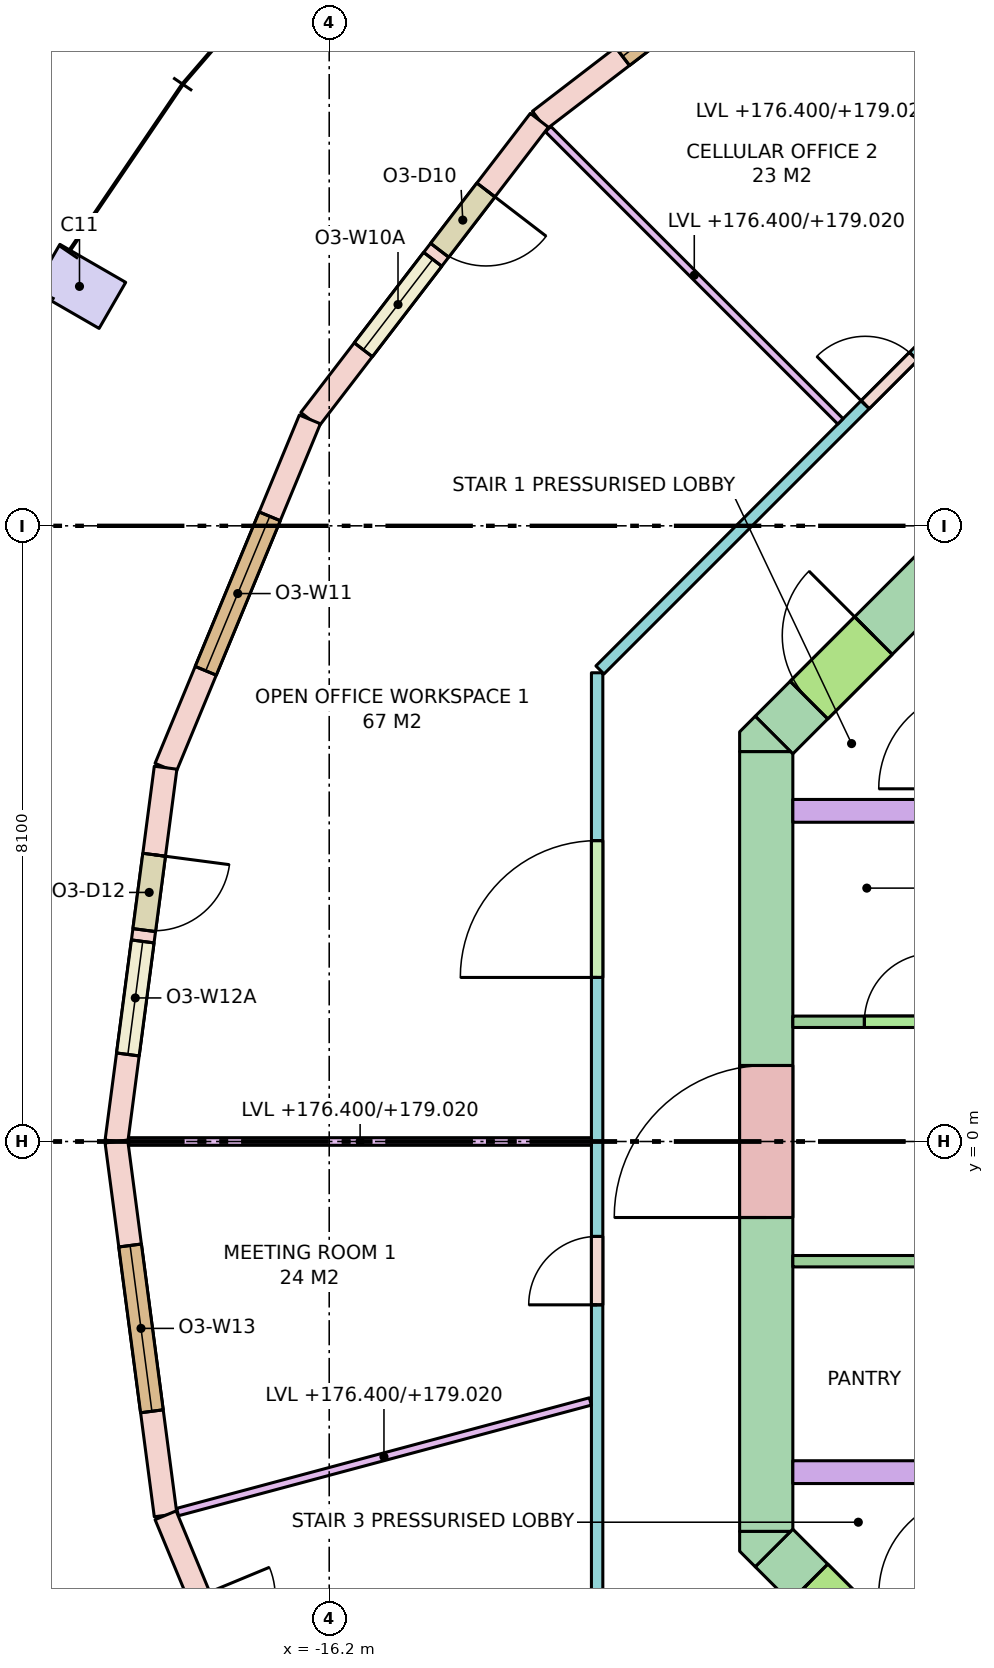
"""IFC4 building model, lengths in metres.
Left out: names, types, materials, properties, quantities, classifications, styles, units other than length and angle.
Written with IfcOpenShell. Run it as: python <this file> out.ifc"""

import sys

from ifc_helpers import new_model, si_unit, direction, frame, frame_2d, origin, origin_2d, place, context, subcontext, project, spatial, polyline, rectangle, outline, extrude, element, fill, save


model = new_model("IFC4")
c1 = context("Model", 3, precision=1e-05, world=origin(), true_north=direction((0.0, 1.0)))
c2 = subcontext(c1, "Body", "Model", "MODEL_VIEW")
j1 = project(units=[si_unit("LENGTHUNIT", "METRE"), si_unit("PLANEANGLEUNIT", "RADIAN")], contexts=[c1])
p1 = place(None, origin())
s1 = spatial("IfcSite", under=j1, at=p1, CompositionType="ELEMENT")
p2 = place(p1, origin())
s2 = spatial("IfcBuilding", under=s1, at=p2, CompositionType="ELEMENT")
p3 = place(p2, frame((0.0, 0.0, 176.4)))
s3 = spatial("IfcBuildingStorey", under=s2, at=p3, CompositionType="ELEMENT", Elevation=176.4)
p4 = place(p3, frame((-19.486, 11.25, 0.0), z_axis=(0.0, 0.0, 1.0), x_axis=(-0.5, -0.866025403784, 0.0)))
e1 = element("IfcColumn", 1, at=p4, inside=s3, PredefinedType="COLUMN", context=c2, shape_type="SweptSolid", body=[
    extrude(rectangle(XDim=0.7, YDim=1.0, at=origin_2d()), origin(), (0.0, 0.0, 1.0), 3.7),
])
p5 = place(p3, frame((-10.45, -5.13, -0.28), z_axis=(0.0, 0.0, 1.0), x_axis=(0.0, 1.0, 0.0)))
e2 = element("IfcWall", 2, at=p5, inside=s3, PredefinedType="SHEAR", context=c2, shape_type="SweptSolid", body=[
    extrude(rectangle(XDim=10.26, YDim=0.7, at=frame_2d((5.13, 0.0))), origin(), (0.0, 0.0, 1.0), 3.7),
])
p6 = place(p5, frame((4.13, 0.0, 0.28)))
e3 = element("IfcOpeningElement", 3, at=p6, cuts=e2, PredefinedType="OPENING", context=c2, shape_type="SweptSolid", body=[
    extrude(rectangle(XDim=2.0, YDim=2.1, at=frame_2d((1.0, 1.05))), frame((0.0, 0.36, 0.0), z_axis=(0.0, -1.0, 0.0), x_axis=(1.0, 0.0, 0.0)), (0.0, 0.0, 1.0), 0.72),
])
p7 = place(p3, frame((-10.347, 5.347, -0.28), z_axis=(0.0, 0.0, 1.0), x_axis=(0.707106781187, 0.707106781187, 0.0)))
e4 = element("IfcWall", 4, at=p7, inside=s3, PredefinedType="SHEAR", context=c2, shape_type="SweptSolid", body=[
    extrude(rectangle(XDim=4.243, YDim=0.7, at=frame_2d((2.121, 0.0))), origin(), (0.0, 0.0, 1.0), 3.7),
])
p8 = place(p7, frame((0.65, 0.0, 0.28)))
e5 = element("IfcOpeningElement", 5, at=p8, cuts=e4, PredefinedType="OPENING", context=c2, shape_type="SweptSolid", body=[
    extrude(rectangle(XDim=1.2, YDim=2.1, at=frame_2d((0.6, 1.05))), frame((0.0, 0.36, 0.0), z_axis=(0.0, -1.0, 0.0), x_axis=(1.0, 0.0, 0.0)), (0.0, 0.0, 1.0), 0.72),
])
p9 = place(p3, frame((-7.347, -8.347, -0.28), z_axis=(0.0, 0.0, 1.0), x_axis=(-0.707106781187, 0.707106781187, 0.0)))
e6 = element("IfcWall", 6, at=p9, inside=s3, PredefinedType="SHEAR", context=c2, shape_type="SweptSolid", body=[
    extrude(rectangle(XDim=4.243, YDim=0.7, at=frame_2d((2.121, 0.0))), origin(), (0.0, 0.0, 1.0), 3.7),
])
p10 = place(p9, frame((2.393, 0.0, 0.28)))
e7 = element("IfcOpeningElement", 7, at=p10, cuts=e6, PredefinedType="OPENING", context=c2, shape_type="SweptSolid", body=[
    extrude(rectangle(XDim=1.2, YDim=2.1, at=frame_2d((0.6, 1.05))), frame((0.0, 0.36, 0.0), z_axis=(0.0, -1.0, 0.0), x_axis=(1.0, 0.0, 0.0)), (0.0, 0.0, 1.0), 0.72),
])
p11 = place(p3, frame((0.0, 0.0, -0.28)))
e8 = element("IfcWall", 8, at=p11, inside=s3, PredefinedType="SHEAR", context=c2, shape_type="SweptSolid", body=[
    extrude(outline(polyline([(-10.8, -5.39), (-10.8, -5.13), (-10.8, -5.13), (-10.13, -5.13), (-10.595, -5.595), (-10.595, -5.595), (-10.595, -5.595), (-10.8, -5.39)])), origin(), (0.0, 0.0, 1.0), 3.7),
])
p12 = place(p3, frame((0.0, 0.0, -0.28)))
e9 = element("IfcWall", 9, at=p12, inside=s3, PredefinedType="SHEAR", context=c2, shape_type="SweptSolid", body=[
    extrude(outline(polyline([(-10.595, 5.595), (-10.595, 5.595), (-10.595, 5.595), (-10.13, 5.13), (-10.8, 5.13), (-10.8, 5.13), (-10.8, 5.39), (-10.595, 5.595)])), origin(), (0.0, 0.0, 1.0), 3.7),
])
for number, where, z_axis, x_axis in (
    (10, (-10.1, 4.35, 0.0), (0.0, 0.0, 1.0), (1.0, 0.0, 0.0)),
    (11, (-10.1, -4.35, 0.0), (0.0, 0.0, 1.0), (1.0, 0.0, 0.0)),
):
    element("IfcWall", number, at=place(p3, frame(where, z_axis=z_axis, x_axis=x_axis)), inside=s3, PredefinedType="SOLIDWALL", context=c2, shape_type="SweptSolid", body=[
        extrude(rectangle(XDim=8.1, YDim=0.3, at=frame_2d((4.05, 0.0))), origin(), (0.0, 0.0, 1.0), 3.42),
    ])
p13 = place(p3, frame((-9.5, 16.455, 0.0), z_axis=(0.0, 0.0, 1.0), x_axis=(-0.793348024649, -0.608768356425, 0.0)))
e12 = element("IfcWall", 12, at=p13, inside=s3, PredefinedType="STANDARD", context=c2, shape_type="SweptSolid", body=[
    extrude(rectangle(XDim=4.96, YDim=0.3, at=frame_2d((2.48, 0.0))), origin(), (0.0, 0.0, 1.0), 3.42),
])
p14 = place(p13, frame((1.38, 0.0, 0.8)))
e13 = element("IfcOpeningElement", 13, at=p14, cuts=e12, PredefinedType="OPENING", context=c2, shape_type="SweptSolid", body=[
    extrude(rectangle(XDim=2.2, YDim=2.4, at=frame_2d((1.1, 1.2))), frame((0.0, 0.16, 0.0), z_axis=(0.0, -1.0, 0.0), x_axis=(1.0, 0.0, 0.0)), (0.0, 0.0, 1.0), 0.32),
])
p15 = place(p3, frame((-13.435, 13.435, 0.0), z_axis=(0.0, 0.0, 1.0), x_axis=(-0.608768356425, -0.793348024649, 0.0)))
e14 = element("IfcWall", 14, at=p15, inside=s3, PredefinedType="STANDARD", context=c2, shape_type="SweptSolid", body=[
    extrude(rectangle(XDim=4.96, YDim=0.3, at=frame_2d((2.48, 0.0))), origin(), (0.0, 0.0, 1.0), 3.42),
])
p16 = place(p15, frame((1.155, 0.0, 0.0)))
e15 = element("IfcOpeningElement", 15, at=p16, cuts=e14, PredefinedType="OPENING", context=c2, shape_type="SweptSolid", body=[
    extrude(rectangle(XDim=1.0, YDim=2.4, at=frame_2d((0.5, 1.2))), frame((0.0, 0.16, 0.0), z_axis=(0.0, -1.0, 0.0), x_axis=(1.0, 0.0, 0.0)), (0.0, 0.0, 1.0), 0.32),
])
p17 = place(p15, frame((2.305, 0.0, 0.8)))
e16 = element("IfcOpeningElement", 16, at=p17, cuts=e14, PredefinedType="OPENING", context=c2, shape_type="SweptSolid", body=[
    extrude(rectangle(XDim=1.5, YDim=2.4, at=frame_2d((0.75, 1.2))), frame((0.0, 0.16, 0.0), z_axis=(0.0, -1.0, 0.0), x_axis=(1.0, 0.0, 0.0)), (0.0, 0.0, 1.0), 0.32),
])
p18 = place(p3, frame((-16.455, 9.5, 0.0), z_axis=(0.0, 0.0, 1.0), x_axis=(-0.382650301762, -0.923893254961, 0.0)))
e17 = element("IfcWall", 17, at=p18, inside=s3, PredefinedType="STANDARD", context=c2, shape_type="SweptSolid", body=[
    extrude(rectangle(XDim=4.96, YDim=0.3, at=frame_2d((2.48, 0.0))), origin(), (0.0, 0.0, 1.0), 3.42),
])
p19 = place(p18, frame((1.38, 0.0, 0.8)))
e18 = element("IfcOpeningElement", 18, at=p19, cuts=e17, PredefinedType="OPENING", context=c2, shape_type="SweptSolid", body=[
    extrude(rectangle(XDim=2.2, YDim=2.4, at=frame_2d((1.1, 1.2))), frame((0.0, 0.16, 0.0), z_axis=(0.0, -1.0, 0.0), x_axis=(1.0, 0.0, 0.0)), (0.0, 0.0, 1.0), 0.32),
])
p20 = place(p3, frame((-18.353, 4.917, 0.0), z_axis=(0.0, 0.0, 1.0), x_axis=(-0.130538549191, -0.991443234469, 0.0)))
e19 = element("IfcWall", 19, at=p20, inside=s3, PredefinedType="STANDARD", context=c2, shape_type="SweptSolid", body=[
    extrude(rectangle(XDim=4.96, YDim=0.3, at=frame_2d((2.48, 0.0))), origin(), (0.0, 0.0, 1.0), 3.42),
])
p21 = place(p20, frame((1.155, 0.0, 0.0)))
e20 = element("IfcOpeningElement", 20, at=p21, cuts=e19, PredefinedType="OPENING", context=c2, shape_type="SweptSolid", body=[
    extrude(rectangle(XDim=1.0, YDim=2.4, at=frame_2d((0.5, 1.2))), frame((0.0, 0.16, 0.0), z_axis=(0.0, -1.0, 0.0), x_axis=(1.0, 0.0, 0.0)), (0.0, 0.0, 1.0), 0.32),
])
p22 = place(p20, frame((2.305, 0.0, 0.8)))
e21 = element("IfcOpeningElement", 21, at=p22, cuts=e19, PredefinedType="OPENING", context=c2, shape_type="SweptSolid", body=[
    extrude(rectangle(XDim=1.5, YDim=2.4, at=frame_2d((0.75, 1.2))), frame((0.0, 0.16, 0.0), z_axis=(0.0, -1.0, 0.0), x_axis=(1.0, 0.0, 0.0)), (0.0, 0.0, 1.0), 0.32),
])
p23 = place(p3, frame((-19.0, 0.0, 0.0), z_axis=(0.0, 0.0, 1.0), x_axis=(0.130538549191, -0.991443234469, 0.0)))
e22 = element("IfcWall", 22, at=p23, inside=s3, PredefinedType="STANDARD", context=c2, shape_type="SweptSolid", body=[
    extrude(rectangle(XDim=4.96, YDim=0.3, at=frame_2d((2.48, 0.0))), origin(), (0.0, 0.0, 1.0), 3.42),
])
p24 = place(p23, frame((1.38, 0.0, 0.8)))
e23 = element("IfcOpeningElement", 23, at=p24, cuts=e22, PredefinedType="OPENING", context=c2, shape_type="SweptSolid", body=[
    extrude(rectangle(XDim=2.2, YDim=2.4, at=frame_2d((1.1, 1.2))), frame((0.0, 0.16, 0.0), z_axis=(0.0, -1.0, 0.0), x_axis=(1.0, 0.0, 0.0)), (0.0, 0.0, 1.0), 0.32),
])
p25 = place(p3, frame((-18.353, -4.917, 0.0), z_axis=(0.0, 0.0, 1.0), x_axis=(0.382650301762, -0.923893254961, 0.0)))
e24 = element("IfcWall", 24, at=p25, inside=s3, PredefinedType="STANDARD", context=c2, shape_type="SweptSolid", body=[
    extrude(rectangle(XDim=4.96, YDim=0.3, at=frame_2d((2.48, 0.0))), origin(), (0.0, 0.0, 1.0), 3.42),
])
p26 = place(p25, frame((1.155, 0.0, 0.0)))
e25 = element("IfcOpeningElement", 25, at=p26, cuts=e24, PredefinedType="OPENING", context=c2, shape_type="SweptSolid", body=[
    extrude(rectangle(XDim=1.0, YDim=2.4, at=frame_2d((0.5, 1.2))), frame((0.0, 0.16, 0.0), z_axis=(0.0, -1.0, 0.0), x_axis=(1.0, 0.0, 0.0)), (0.0, 0.0, 1.0), 0.32),
])
p27 = place(p25, frame((2.305, 0.0, 0.8)))
e26 = element("IfcOpeningElement", 26, at=p27, cuts=e24, PredefinedType="OPENING", context=c2, shape_type="SweptSolid", body=[
    extrude(rectangle(XDim=1.5, YDim=2.4, at=frame_2d((0.75, 1.2))), frame((0.0, 0.16, 0.0), z_axis=(0.0, -1.0, 0.0), x_axis=(1.0, 0.0, 0.0)), (0.0, 0.0, 1.0), 0.32),
])
p28 = place(p3, frame((-10.1, 1.575, 0.0), z_axis=(0.0, 0.0, 1.0), x_axis=(1.0, 0.0, 0.0)))
e27 = element("IfcWall", 27, at=p28, inside=s3, PredefinedType="PARTITIONING", context=c2, shape_type="SweptSolid", body=[
    extrude(rectangle(XDim=8.1, YDim=0.15, at=frame_2d((4.05, 0.0))), origin(), (0.0, 0.0, 1.0), 3.42),
])
p29 = place(p28, frame((0.941, 0.0, 0.0)))
e28 = element("IfcOpeningElement", 28, at=p29, cuts=e27, PredefinedType="OPENING", context=c2, shape_type="SweptSolid", body=[
    extrude(rectangle(XDim=0.9, YDim=2.1, at=frame_2d((0.45, 1.05))), frame((0.0, 0.085, 0.0), z_axis=(0.0, -1.0, 0.0), x_axis=(1.0, 0.0, 0.0)), (0.0, 0.0, 1.0), 0.17),
])
p30 = place(p28, frame((5.066, 0.0, 0.0)))
e29 = element("IfcOpeningElement", 29, at=p30, cuts=e27, PredefinedType="OPENING", context=c2, shape_type="SweptSolid", body=[
    extrude(rectangle(XDim=0.9, YDim=2.1, at=frame_2d((0.45, 1.05))), frame((0.0, 0.085, 0.0), z_axis=(0.0, -1.0, 0.0), x_axis=(1.0, 0.0, 0.0)), (0.0, 0.0, 1.0), 0.17),
])
p31 = place(p3, frame((-10.1, -1.575, 0.0), z_axis=(0.0, 0.0, 1.0), x_axis=(1.0, 0.0, 0.0)))
e30 = element("IfcWall", 30, at=p31, inside=s3, PredefinedType="PARTITIONING", context=c2, shape_type="SweptSolid", body=[
    extrude(rectangle(XDim=8.1, YDim=0.15, at=frame_2d((4.05, 0.0))), origin(), (0.0, 0.0, 1.0), 3.42),
])
p32 = place(p31, frame((2.333, 0.0, 0.0)))
e31 = element("IfcOpeningElement", 31, at=p32, cuts=e30, PredefinedType="OPENING", context=c2, shape_type="SweptSolid", body=[
    extrude(rectangle(XDim=0.9, YDim=2.1, at=frame_2d((0.45, 1.05))), frame((0.0, 0.085, 0.0), z_axis=(0.0, -1.0, 0.0), x_axis=(1.0, 0.0, 0.0)), (0.0, 0.0, 1.0), 0.17),
])
p33 = place(p31, frame((6.35, 0.0, 0.0)))
e32 = element("IfcOpeningElement", 32, at=p33, cuts=e30, PredefinedType="OPENING", context=c2, shape_type="SweptSolid", body=[
    extrude(rectangle(XDim=0.9, YDim=2.1, at=frame_2d((0.45, 1.05))), frame((0.0, 0.085, 0.0), z_axis=(0.0, -1.0, 0.0), x_axis=(1.0, 0.0, 0.0)), (0.0, 0.0, 1.0), 0.17),
])
p34 = place(p3, frame((-12.675, -6.167, 0.0), z_axis=(0.0, 0.0, 1.0), x_axis=(0.0, 1.0, 0.0)))
e33 = element("IfcWall", 33, at=p34, inside=s3, PredefinedType="PARTITIONING", context=c2, shape_type="SweptSolid", body=[
    extrude(rectangle(XDim=12.333, YDim=0.15, at=frame_2d((6.167, 0.0))), origin(), (0.0, 0.0, 1.0), 2.62),
])
p35 = place(p34, frame((8.325, 0.0, 0.0)))
e34 = element("IfcOpeningElement", 34, at=p35, cuts=e33, PredefinedType="OPENING", context=c2, shape_type="SweptSolid", body=[
    extrude(rectangle(XDim=1.8, YDim=2.1, at=frame_2d((0.9, 1.05))), frame((0.0, 0.085, 0.0), z_axis=(0.0, -1.0, 0.0), x_axis=(1.0, 0.0, 0.0)), (0.0, 0.0, 1.0), 0.17),
])
p36 = place(p34, frame((4.018, 0.0, 0.0)))
e35 = element("IfcOpeningElement", 35, at=p36, cuts=e33, PredefinedType="OPENING", context=c2, shape_type="SweptSolid", body=[
    extrude(rectangle(XDim=0.9, YDim=2.1, at=frame_2d((0.45, 1.05))), frame((0.0, 0.085, 0.0), z_axis=(0.0, -1.0, 0.0), x_axis=(1.0, 0.0, 0.0)), (0.0, 0.0, 1.0), 0.17),
])
p37 = place(p3, frame((-12.638, 6.204, 0.0), z_axis=(0.0, 0.0, 1.0), x_axis=(0.707106781187, 0.707106781187, 0.0)))
e36 = element("IfcWall", 36, at=p37, inside=s3, PredefinedType="PARTITIONING", context=c2, shape_type="SweptSolid", body=[
    extrude(rectangle(XDim=6.271, YDim=0.15, at=frame_2d((3.135, 0.0))), origin(), (0.0, 0.0, 1.0), 2.62),
])
p38 = place(p37, frame((4.935, 0.0, 0.0)))
e37 = element("IfcOpeningElement", 37, at=p38, cuts=e36, PredefinedType="OPENING", context=c2, shape_type="SweptSolid", body=[
    extrude(rectangle(XDim=0.9, YDim=2.1, at=frame_2d((0.45, 1.05))), frame((0.0, 0.085, 0.0), z_axis=(0.0, -1.0, 0.0), x_axis=(1.0, 0.0, 0.0)), (0.0, 0.0, 1.0), 0.17),
])
p39 = place(p3, frame((-6.221, 10.775, 0.0), z_axis=(0.0, 0.0, 1.0), x_axis=(-0.500023166934, 0.866012027936, 0.0)))
e38 = element("IfcWall", 38, at=p39, inside=s3, PredefinedType="PARTITIONING", context=c2, shape_type="SweptSolid", body=[
    extrude(rectangle(XDim=6.395, YDim=0.1, at=frame_2d((3.198, 0.0))), origin(), (0.0, 0.0, 1.0), 2.62),
])
p40 = place(p3, frame((-9.474, 9.474, 0.0), z_axis=(0.0, 0.0, 1.0), x_axis=(-0.707106781187, 0.707106781187, 0.0)))
e39 = element("IfcWall", 39, at=p40, inside=s3, PredefinedType="PARTITIONING", context=c2, shape_type="SweptSolid", body=[
    extrude(rectangle(XDim=5.439, YDim=0.1, at=frame_2d((2.719, 0.0))), origin(), (0.0, 0.0, 1.0), 2.62),
])
p41 = place(p3, frame((-12.75, 0.0, 0.0), z_axis=(0.0, 0.0, 1.0), x_axis=(-1.0, 0.0, 0.0)))
e40 = element("IfcWall", 40, at=p41, inside=s3, PredefinedType="PARTITIONING", context=c2, shape_type="SweptSolid", body=[
    extrude(rectangle(XDim=6.087, YDim=0.1, at=frame_2d((3.043, 0.0))), origin(), (0.0, 0.0, 1.0), 2.62),
])
p42 = place(p3, frame((-12.764, -3.42, 0.0), z_axis=(0.0, 0.0, 1.0), x_axis=(-0.965925759926, -0.258819292773, 0.0)))
e41 = element("IfcWall", 41, at=p42, inside=s3, PredefinedType="PARTITIONING", context=c2, shape_type="SweptSolid", body=[
    extrude(rectangle(XDim=5.622, YDim=0.1, at=frame_2d((2.811, 0.0))), origin(), (0.0, 0.0, 1.0), 2.62),
])
p43 = place(p14, origin())
e42 = element("IfcWindow", 42, at=p43, inside=s3, PartitioningType="SINGLE_PANEL", PredefinedType="WINDOW", context=c2, shape_type="SweptSolid", body=[
    extrude(rectangle(XDim=2.2, YDim=2.4, at=frame_2d((1.1, 1.2))), frame((0.0, 0.03, 0.0), z_axis=(0.0, -1.0, 0.0), x_axis=(1.0, 0.0, 0.0)), (0.0, 0.0, 1.0), 0.06),
])
fill(e13, e42)
p44 = place(p16, origin())
e43 = element("IfcDoor", 43, at=p44, inside=s3, OperationType="SINGLE_SWING_LEFT", PredefinedType="DOOR", context=c2, shape_type="SweptSolid", body=[
    extrude(rectangle(XDim=1.0, YDim=2.4, at=frame_2d((0.5, 1.2))), frame((0.0, 0.025, 0.0), z_axis=(0.0, -1.0, 0.0), x_axis=(1.0, 0.0, 0.0)), (0.0, 0.0, 1.0), 0.05),
])
fill(e15, e43)
p45 = place(p17, origin())
e44 = element("IfcWindow", 44, at=p45, inside=s3, PartitioningType="SINGLE_PANEL", PredefinedType="WINDOW", context=c2, shape_type="SweptSolid", body=[
    extrude(rectangle(XDim=1.5, YDim=2.4, at=frame_2d((0.75, 1.2))), frame((0.0, 0.03, 0.0), z_axis=(0.0, -1.0, 0.0), x_axis=(1.0, 0.0, 0.0)), (0.0, 0.0, 1.0), 0.06),
])
fill(e16, e44)
p46 = place(p19, origin())
e45 = element("IfcWindow", 45, at=p46, inside=s3, PartitioningType="SINGLE_PANEL", PredefinedType="WINDOW", context=c2, shape_type="SweptSolid", body=[
    extrude(rectangle(XDim=2.2, YDim=2.4, at=frame_2d((1.1, 1.2))), frame((0.0, 0.03, 0.0), z_axis=(0.0, -1.0, 0.0), x_axis=(1.0, 0.0, 0.0)), (0.0, 0.0, 1.0), 0.06),
])
fill(e18, e45)
p47 = place(p21, origin())
e46 = element("IfcDoor", 46, at=p47, inside=s3, OperationType="SINGLE_SWING_LEFT", PredefinedType="DOOR", context=c2, shape_type="SweptSolid", body=[
    extrude(rectangle(XDim=1.0, YDim=2.4, at=frame_2d((0.5, 1.2))), frame((0.0, 0.025, 0.0), z_axis=(0.0, -1.0, 0.0), x_axis=(1.0, 0.0, 0.0)), (0.0, 0.0, 1.0), 0.05),
])
fill(e20, e46)
p48 = place(p22, origin())
e47 = element("IfcWindow", 47, at=p48, inside=s3, PartitioningType="SINGLE_PANEL", PredefinedType="WINDOW", context=c2, shape_type="SweptSolid", body=[
    extrude(rectangle(XDim=1.5, YDim=2.4, at=frame_2d((0.75, 1.2))), frame((0.0, 0.03, 0.0), z_axis=(0.0, -1.0, 0.0), x_axis=(1.0, 0.0, 0.0)), (0.0, 0.0, 1.0), 0.06),
])
fill(e21, e47)
p49 = place(p24, origin())
e48 = element("IfcWindow", 48, at=p49, inside=s3, PartitioningType="SINGLE_PANEL", PredefinedType="WINDOW", context=c2, shape_type="SweptSolid", body=[
    extrude(rectangle(XDim=2.2, YDim=2.4, at=frame_2d((1.1, 1.2))), frame((0.0, 0.03, 0.0), z_axis=(0.0, -1.0, 0.0), x_axis=(1.0, 0.0, 0.0)), (0.0, 0.0, 1.0), 0.06),
])
fill(e23, e48)
p50 = place(p8, origin())
e49 = element("IfcDoor", 49, at=p50, inside=s3, OperationType="SINGLE_SWING_RIGHT", PredefinedType="DOOR", context=c2, shape_type="SweptSolid", body=[
    extrude(rectangle(XDim=1.2, YDim=2.1, at=frame_2d((0.6, 1.05))), frame((0.0, 0.025, 0.0), z_axis=(0.0, -1.0, 0.0), x_axis=(1.0, 0.0, 0.0)), (0.0, 0.0, 1.0), 0.05),
])
fill(e5, e49)
p51 = place(p10, origin())
e50 = element("IfcDoor", 50, at=p51, inside=s3, OperationType="SINGLE_SWING_RIGHT", PredefinedType="DOOR", context=c2, shape_type="SweptSolid", body=[
    extrude(rectangle(XDim=1.2, YDim=2.1, at=frame_2d((0.6, 1.05))), frame((0.0, 0.025, 0.0), z_axis=(0.0, -1.0, 0.0), x_axis=(1.0, 0.0, 0.0)), (0.0, 0.0, 1.0), 0.05),
])
fill(e7, e50)
p52 = place(p6, origin())
e51 = element("IfcDoor", 51, at=p52, inside=s3, OperationType="DOUBLE_DOOR_SINGLE_SWING", PredefinedType="DOOR", context=c2, shape_type="SweptSolid", body=[
    extrude(rectangle(XDim=2.0, YDim=2.1, at=frame_2d((1.0, 1.05))), frame((0.0, 0.025, 0.0), z_axis=(0.0, -1.0, 0.0), x_axis=(1.0, 0.0, 0.0)), (0.0, 0.0, 1.0), 0.05),
])
fill(e3, e51)
p53 = place(p29, origin())
e52 = element("IfcDoor", 52, at=p53, inside=s3, OperationType="SINGLE_SWING_RIGHT", PredefinedType="DOOR", context=c2, shape_type="SweptSolid", body=[
    extrude(rectangle(XDim=0.9, YDim=2.1, at=frame_2d((0.45, 1.05))), frame((0.0, 0.025, 0.0), z_axis=(0.0, -1.0, 0.0), x_axis=(1.0, 0.0, 0.0)), (0.0, 0.0, 1.0), 0.05),
])
fill(e28, e52)
p54 = place(p35, origin())
e53 = element("IfcDoor", 53, at=p54, inside=s3, OperationType="DOUBLE_DOOR_SINGLE_SWING", PredefinedType="DOOR", context=c2, shape_type="SweptSolid", body=[
    extrude(rectangle(XDim=1.8, YDim=2.1, at=frame_2d((0.9, 1.05))), frame((0.0, 0.025, 0.0), z_axis=(0.0, -1.0, 0.0), x_axis=(1.0, 0.0, 0.0)), (0.0, 0.0, 1.0), 0.05),
])
fill(e34, e53)
p55 = place(p36, origin())
e54 = element("IfcDoor", 54, at=p55, inside=s3, OperationType="SINGLE_SWING_LEFT", PredefinedType="DOOR", context=c2, shape_type="SweptSolid", body=[
    extrude(rectangle(XDim=0.9, YDim=2.1, at=frame_2d((0.45, 1.05))), frame((0.0, 0.025, 0.0), z_axis=(0.0, -1.0, 0.0), x_axis=(1.0, 0.0, 0.0)), (0.0, 0.0, 1.0), 0.05),
])
fill(e35, e54)
p56 = place(p38, origin())
e55 = element("IfcDoor", 55, at=p56, inside=s3, OperationType="SINGLE_SWING_LEFT", PredefinedType="DOOR", context=c2, shape_type="SweptSolid", body=[
    extrude(rectangle(XDim=0.9, YDim=2.1, at=frame_2d((0.45, 1.05))), frame((0.0, 0.025, 0.0), z_axis=(0.0, -1.0, 0.0), x_axis=(1.0, 0.0, 0.0)), (0.0, 0.0, 1.0), 0.05),
])
fill(e37, e55)
save(model, sys.argv[1])
